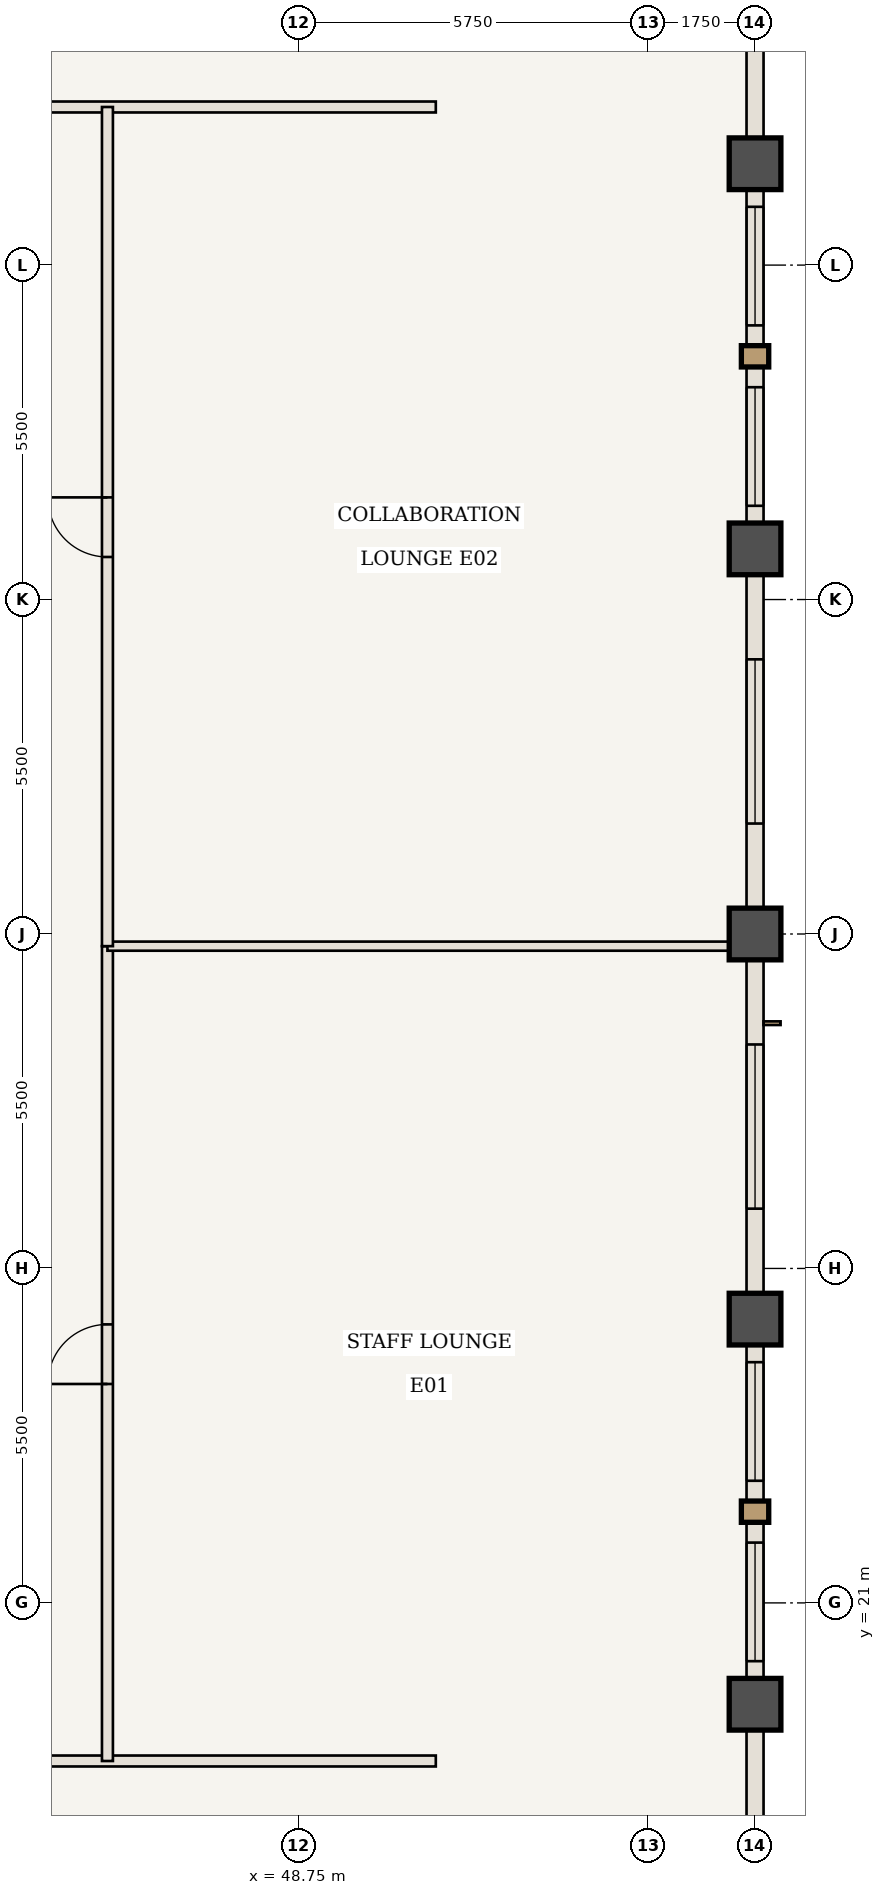
"""IFC4 building model, lengths in metres.
Left out: names, types, materials, properties, quantities, classifications, styles, units other than length and angle.
Written with IfcOpenShell. Run it as: python <this file> out.ifc"""

import sys

from ifc_helpers import new_model, si_unit, direction, frame, frame_2d, origin, origin_2d, place, context, subcontext, project, spatial, rectangle, extrude, element, fill, save


model = new_model("IFC4")
c1 = context("Model", 3, precision=1e-05, world=origin(), true_north=direction((0.0, 1.0)))
c2 = subcontext(c1, "Body", "Model", "MODEL_VIEW")
j1 = project(units=[si_unit("LENGTHUNIT", "METRE"), si_unit("PLANEANGLEUNIT", "RADIAN")], contexts=[c1])
p1 = place(None, origin())
s1 = spatial("IfcSite", under=j1, at=p1, CompositionType="ELEMENT")
p2 = place(p1, origin())
s2 = spatial("IfcBuilding", under=s1, at=p2, CompositionType="ELEMENT")
p3 = place(p2, frame((0.0, 0.0, 190.75)))
s3 = spatial("IfcBuildingStorey", under=s2, at=p3, CompositionType="ELEMENT", Elevation=190.75)
for number, where, z_axis, x_axis in (
    (1, (56.25, 19.333, 0.0), (0.0, 0.0, 1.0), (1.0, 0.0, 0.0)),
    (2, (56.25, 25.667, 0.0), (0.0, 0.0, 1.0), (1.0, 0.0, 0.0)),
    (3, (56.25, 32.0, 0.0), (0.0, 0.0, 1.0), (1.0, 0.0, 0.0)),
    (4, (56.25, 38.333, 0.0), (0.0, 0.0, 1.0), (1.0, 0.0, 0.0)),
    (5, (56.25, 44.667, 0.0), (0.0, 0.0, 1.0), (1.0, 0.0, 0.0)),
):
    element("IfcColumn", number, at=place(p3, frame(where, z_axis=z_axis, x_axis=x_axis)), inside=s3, PredefinedType="COLUMN", context=c2, shape_type="SweptSolid", body=[
        extrude(rectangle(XDim=0.85, YDim=0.85, at=origin_2d()), origin(), (0.0, 0.0, 1.0), 3.85),
    ])
p4 = place(p3, frame((13.0, 18.4, 0.0), z_axis=(0.0, 0.0, 1.0), x_axis=(1.0, 0.0, 0.0)))
e6 = element("IfcWall", 6, at=p4, inside=s3, PredefinedType="STANDARD", context=c2, shape_type="SweptSolid", body=[
    extrude(rectangle(XDim=38.0, YDim=0.18, at=frame_2d((19.0, 0.0))), origin(), (0.0, 0.0, 1.0), 3.685),
])
p5 = place(p4, frame((19.925, 0.0, 0.0)))
e7 = element("IfcOpeningElement", 7, at=p5, cuts=e6, PredefinedType="OPENING", context=c2, shape_type="SweptSolid", body=[
    extrude(rectangle(XDim=0.98, YDim=2.2, at=frame_2d((0.49, 1.1))), frame((0.0, 0.1, 0.0), z_axis=(0.0, -1.0, 0.0), x_axis=(1.0, 0.0, 0.0)), (0.0, 0.0, 1.0), 0.2),
])
p6 = place(p3, frame((39.083, 45.6, 0.0), z_axis=(0.0, 0.0, 1.0), x_axis=(1.0, 0.0, 0.0)))
e8 = element("IfcWall", 8, at=p6, inside=s3, PredefinedType="STANDARD", context=c2, shape_type="SweptSolid", body=[
    extrude(rectangle(XDim=11.917, YDim=0.18, at=frame_2d((5.958, 0.0))), origin(), (0.0, 0.0, 1.0), 3.685),
])
p7 = place(p6, frame((1.283, 0.0, 0.0)))
e9 = element("IfcOpeningElement", 9, at=p7, cuts=e8, PredefinedType="OPENING", context=c2, shape_type="SweptSolid", body=[
    extrude(rectangle(XDim=0.98, YDim=2.2, at=frame_2d((0.49, 1.1))), frame((0.0, 0.1, 0.0), z_axis=(0.0, -1.0, 0.0), x_axis=(1.0, 0.0, 0.0)), (0.0, 0.0, 1.0), 0.2),
])
p8 = place(p3, frame((45.6, 18.4, 0.0), z_axis=(0.0, 0.0, 1.0), x_axis=(0.0, 1.0, 0.0)))
e10 = element("IfcWall", 10, at=p8, inside=s3, PredefinedType="STANDARD", context=c2, shape_type="SweptSolid", body=[
    extrude(rectangle(XDim=13.4, YDim=0.18, at=frame_2d((6.7, 0.0))), origin(), (0.0, 0.0, 1.0), 3.685),
])
p9 = place(p8, frame((6.2, 0.0, 0.0)))
e11 = element("IfcOpeningElement", 11, at=p9, cuts=e10, PredefinedType="OPENING", context=c2, shape_type="SweptSolid", body=[
    extrude(rectangle(XDim=0.98, YDim=2.2, at=frame_2d((0.49, 1.1))), frame((0.0, 0.1, 0.0), z_axis=(0.0, -1.0, 0.0), x_axis=(1.0, 0.0, 0.0)), (0.0, 0.0, 1.0), 0.2),
])
p10 = place(p3, frame((45.6, 31.8, 0.0), z_axis=(0.0, 0.0, 1.0), x_axis=(1.0, 0.0, 0.0)))
e12 = element("IfcWall", 12, at=p10, inside=s3, PredefinedType="STANDARD", context=c2, shape_type="SweptSolid", body=[
    extrude(rectangle(XDim=10.59, YDim=0.15, at=frame_2d((5.295, 0.0))), origin(), (0.0, 0.0, 1.0), 3.134),
])
p11 = place(p3, frame((45.6, 31.8, 0.0), z_axis=(0.0, 0.0, 1.0), x_axis=(0.0, 1.0, 0.0)))
e13 = element("IfcWall", 13, at=p11, inside=s3, PredefinedType="STANDARD", context=c2, shape_type="SweptSolid", body=[
    extrude(rectangle(XDim=13.8, YDim=0.18, at=frame_2d((6.9, 0.0))), origin(), (0.0, 0.0, 1.0), 3.685),
])
p12 = place(p11, frame((6.4, 0.0, 0.0)))
e14 = element("IfcOpeningElement", 14, at=p12, cuts=e13, PredefinedType="OPENING", context=c2, shape_type="SweptSolid", body=[
    extrude(rectangle(XDim=0.98, YDim=2.2, at=frame_2d((0.49, 1.1))), frame((0.0, 0.1, 0.0), z_axis=(0.0, -1.0, 0.0), x_axis=(1.0, 0.0, 0.0)), (0.0, 0.0, 1.0), 0.2),
])
p13 = place(p3, frame((56.25, 19.333, 0.0), z_axis=(0.0, 0.0, 1.0), x_axis=(0.0, -1.0, 0.0)))
e15 = element("IfcWall", 15, at=p13, inside=s3, PredefinedType="USERDEFINED", context=c2, shape_type="SweptSolid", body=[
    extrude(rectangle(XDim=6.333, YDim=0.28, at=frame_2d((3.167, 0.0))), origin(), (0.0, 0.0, 1.0), 2.985),
])
p14 = place(p3, frame((56.25, 25.667, 0.0), z_axis=(0.0, 0.0, 1.0), x_axis=(0.0, -1.0, 0.0)))
e16 = element("IfcWall", 16, at=p14, inside=s3, PredefinedType="USERDEFINED", context=c2, shape_type="SweptSolid", body=[
    extrude(rectangle(XDim=6.333, YDim=0.28, at=frame_2d((3.167, 0.0))), origin(), (0.0, 0.0, 1.0), 2.985),
])
p15 = place(p14, frame((0.708, 0.0, 0.85)))
e17 = element("IfcOpeningElement", 17, at=p15, cuts=e16, PredefinedType="OPENING", context=c2, shape_type="SweptSolid", body=[
    extrude(rectangle(XDim=1.95, YDim=1.935, at=frame_2d((0.975, 0.968))), frame((0.0, 0.15, 0.0), z_axis=(0.0, -1.0, 0.0), x_axis=(1.0, 0.0, 0.0)), (0.0, 0.0, 1.0), 0.3),
])
p16 = place(p14, frame((3.675, 0.0, 0.85)))
e18 = element("IfcOpeningElement", 18, at=p16, cuts=e16, PredefinedType="OPENING", context=c2, shape_type="SweptSolid", body=[
    extrude(rectangle(XDim=1.95, YDim=1.935, at=frame_2d((0.975, 0.968))), frame((0.0, 0.15, 0.0), z_axis=(0.0, -1.0, 0.0), x_axis=(1.0, 0.0, 0.0)), (0.0, 0.0, 1.0), 0.3),
])
p17 = place(p3, frame((56.25, 32.0, 0.0), z_axis=(0.0, 0.0, 1.0), x_axis=(0.0, -1.0, 0.0)))
e19 = element("IfcWall", 19, at=p17, inside=s3, PredefinedType="USERDEFINED", context=c2, shape_type="SweptSolid", body=[
    extrude(rectangle(XDim=6.333, YDim=0.28, at=frame_2d((3.167, 0.0))), origin(), (0.0, 0.0, 1.0), 2.985),
])
p18 = place(p17, frame((1.817, 0.0, 0.85)))
e20 = element("IfcOpeningElement", 20, at=p18, cuts=e19, PredefinedType="OPENING", context=c2, shape_type="SweptSolid", body=[
    extrude(rectangle(XDim=2.7, YDim=1.935, at=frame_2d((1.35, 0.968))), frame((0.0, 0.15, 0.0), z_axis=(0.0, -1.0, 0.0), x_axis=(1.0, 0.0, 0.0)), (0.0, 0.0, 1.0), 0.3),
])
p19 = place(p3, frame((56.25, 38.333, 0.0), z_axis=(0.0, 0.0, 1.0), x_axis=(0.0, -1.0, 0.0)))
e21 = element("IfcWall", 21, at=p19, inside=s3, PredefinedType="USERDEFINED", context=c2, shape_type="SweptSolid", body=[
    extrude(rectangle(XDim=6.333, YDim=0.28, at=frame_2d((3.167, 0.0))), origin(), (0.0, 0.0, 1.0), 2.985),
])
p20 = place(p19, frame((1.817, 0.0, 0.85)))
e22 = element("IfcOpeningElement", 22, at=p20, cuts=e21, PredefinedType="OPENING", context=c2, shape_type="SweptSolid", body=[
    extrude(rectangle(XDim=2.7, YDim=1.935, at=frame_2d((1.35, 0.968))), frame((0.0, 0.15, 0.0), z_axis=(0.0, -1.0, 0.0), x_axis=(1.0, 0.0, 0.0)), (0.0, 0.0, 1.0), 0.3),
])
p21 = place(p3, frame((56.25, 44.667, 0.0), z_axis=(0.0, 0.0, 1.0), x_axis=(0.0, -1.0, 0.0)))
e23 = element("IfcWall", 23, at=p21, inside=s3, PredefinedType="USERDEFINED", context=c2, shape_type="SweptSolid", body=[
    extrude(rectangle(XDim=6.333, YDim=0.28, at=frame_2d((3.167, 0.0))), origin(), (0.0, 0.0, 1.0), 2.985),
])
p22 = place(p21, frame((0.708, 0.0, 0.85)))
e24 = element("IfcOpeningElement", 24, at=p22, cuts=e23, PredefinedType="OPENING", context=c2, shape_type="SweptSolid", body=[
    extrude(rectangle(XDim=1.95, YDim=1.935, at=frame_2d((0.975, 0.968))), frame((0.0, 0.15, 0.0), z_axis=(0.0, -1.0, 0.0), x_axis=(1.0, 0.0, 0.0)), (0.0, 0.0, 1.0), 0.3),
])
p23 = place(p21, frame((3.675, 0.0, 0.85)))
e25 = element("IfcOpeningElement", 25, at=p23, cuts=e23, PredefinedType="OPENING", context=c2, shape_type="SweptSolid", body=[
    extrude(rectangle(XDim=1.95, YDim=1.935, at=frame_2d((0.975, 0.968))), frame((0.0, 0.15, 0.0), z_axis=(0.0, -1.0, 0.0), x_axis=(1.0, 0.0, 0.0)), (0.0, 0.0, 1.0), 0.3),
])
p24 = place(p3, frame((56.25, 51.0, 0.0), z_axis=(0.0, 0.0, 1.0), x_axis=(0.0, -1.0, 0.0)))
e26 = element("IfcWall", 26, at=p24, inside=s3, PredefinedType="USERDEFINED", context=c2, shape_type="SweptSolid", body=[
    extrude(rectangle(XDim=6.333, YDim=0.28, at=frame_2d((3.167, 0.0))), origin(), (0.0, 0.0, 1.0), 2.985),
])
p25 = place(p9, origin())
e27 = element("IfcDoor", 27, at=p25, inside=s3, OperationType="SINGLE_SWING_LEFT", PredefinedType="DOOR", context=c2, shape_type="SweptSolid", body=[
    extrude(rectangle(XDim=0.98, YDim=2.2, at=frame_2d((0.49, 1.1))), frame((0.0, 0.025, 0.0), z_axis=(0.0, -1.0, 0.0), x_axis=(1.0, 0.0, 0.0)), (0.0, 0.0, 1.0), 0.05),
])
fill(e11, e27)
p26 = place(p12, origin())
e28 = element("IfcDoor", 28, at=p26, inside=s3, OperationType="SINGLE_SWING_RIGHT", PredefinedType="DOOR", context=c2, shape_type="SweptSolid", body=[
    extrude(rectangle(XDim=0.98, YDim=2.2, at=frame_2d((0.49, 1.1))), frame((0.0, 0.025, 0.0), z_axis=(0.0, -1.0, 0.0), x_axis=(1.0, 0.0, 0.0)), (0.0, 0.0, 1.0), 0.05),
])
fill(e14, e28)
p27 = place(p15, origin())
e29 = element("IfcWindow", 29, at=p27, inside=s3, PartitioningType="SINGLE_PANEL", PredefinedType="WINDOW", context=c2, shape_type="SweptSolid", body=[
    extrude(rectangle(XDim=1.95, YDim=1.935, at=frame_2d((0.975, 0.968))), frame((0.0, 0.03, 0.0), z_axis=(0.0, -1.0, 0.0), x_axis=(1.0, 0.0, 0.0)), (0.0, 0.0, 1.0), 0.06),
])
fill(e17, e29)
p28 = place(p16, origin())
e30 = element("IfcWindow", 30, at=p28, inside=s3, PartitioningType="SINGLE_PANEL", PredefinedType="WINDOW", context=c2, shape_type="SweptSolid", body=[
    extrude(rectangle(XDim=1.95, YDim=1.935, at=frame_2d((0.975, 0.968))), frame((0.0, 0.03, 0.0), z_axis=(0.0, -1.0, 0.0), x_axis=(1.0, 0.0, 0.0)), (0.0, 0.0, 1.0), 0.06),
])
fill(e18, e30)
p29 = place(p18, origin())
e31 = element("IfcWindow", 31, at=p29, inside=s3, PartitioningType="SINGLE_PANEL", PredefinedType="WINDOW", context=c2, shape_type="SweptSolid", body=[
    extrude(rectangle(XDim=2.7, YDim=1.935, at=frame_2d((1.35, 0.968))), frame((0.0, 0.03, 0.0), z_axis=(0.0, -1.0, 0.0), x_axis=(1.0, 0.0, 0.0)), (0.0, 0.0, 1.0), 0.06),
])
fill(e20, e31)
p30 = place(p20, origin())
e32 = element("IfcWindow", 32, at=p30, inside=s3, PartitioningType="SINGLE_PANEL", PredefinedType="WINDOW", context=c2, shape_type="SweptSolid", body=[
    extrude(rectangle(XDim=2.7, YDim=1.935, at=frame_2d((1.35, 0.968))), frame((0.0, 0.03, 0.0), z_axis=(0.0, -1.0, 0.0), x_axis=(1.0, 0.0, 0.0)), (0.0, 0.0, 1.0), 0.06),
])
fill(e22, e32)
p31 = place(p22, origin())
e33 = element("IfcWindow", 33, at=p31, inside=s3, PartitioningType="SINGLE_PANEL", PredefinedType="WINDOW", context=c2, shape_type="SweptSolid", body=[
    extrude(rectangle(XDim=1.95, YDim=1.935, at=frame_2d((0.975, 0.968))), frame((0.0, 0.03, 0.0), z_axis=(0.0, -1.0, 0.0), x_axis=(1.0, 0.0, 0.0)), (0.0, 0.0, 1.0), 0.06),
])
fill(e24, e33)
p32 = place(p23, origin())
e34 = element("IfcWindow", 34, at=p32, inside=s3, PartitioningType="SINGLE_PANEL", PredefinedType="WINDOW", context=c2, shape_type="SweptSolid", body=[
    extrude(rectangle(XDim=1.95, YDim=1.935, at=frame_2d((0.975, 0.968))), frame((0.0, 0.03, 0.0), z_axis=(0.0, -1.0, 0.0), x_axis=(1.0, 0.0, 0.0)), (0.0, 0.0, 1.0), 0.06),
])
fill(e25, e34)
save(model, sys.argv[1])
